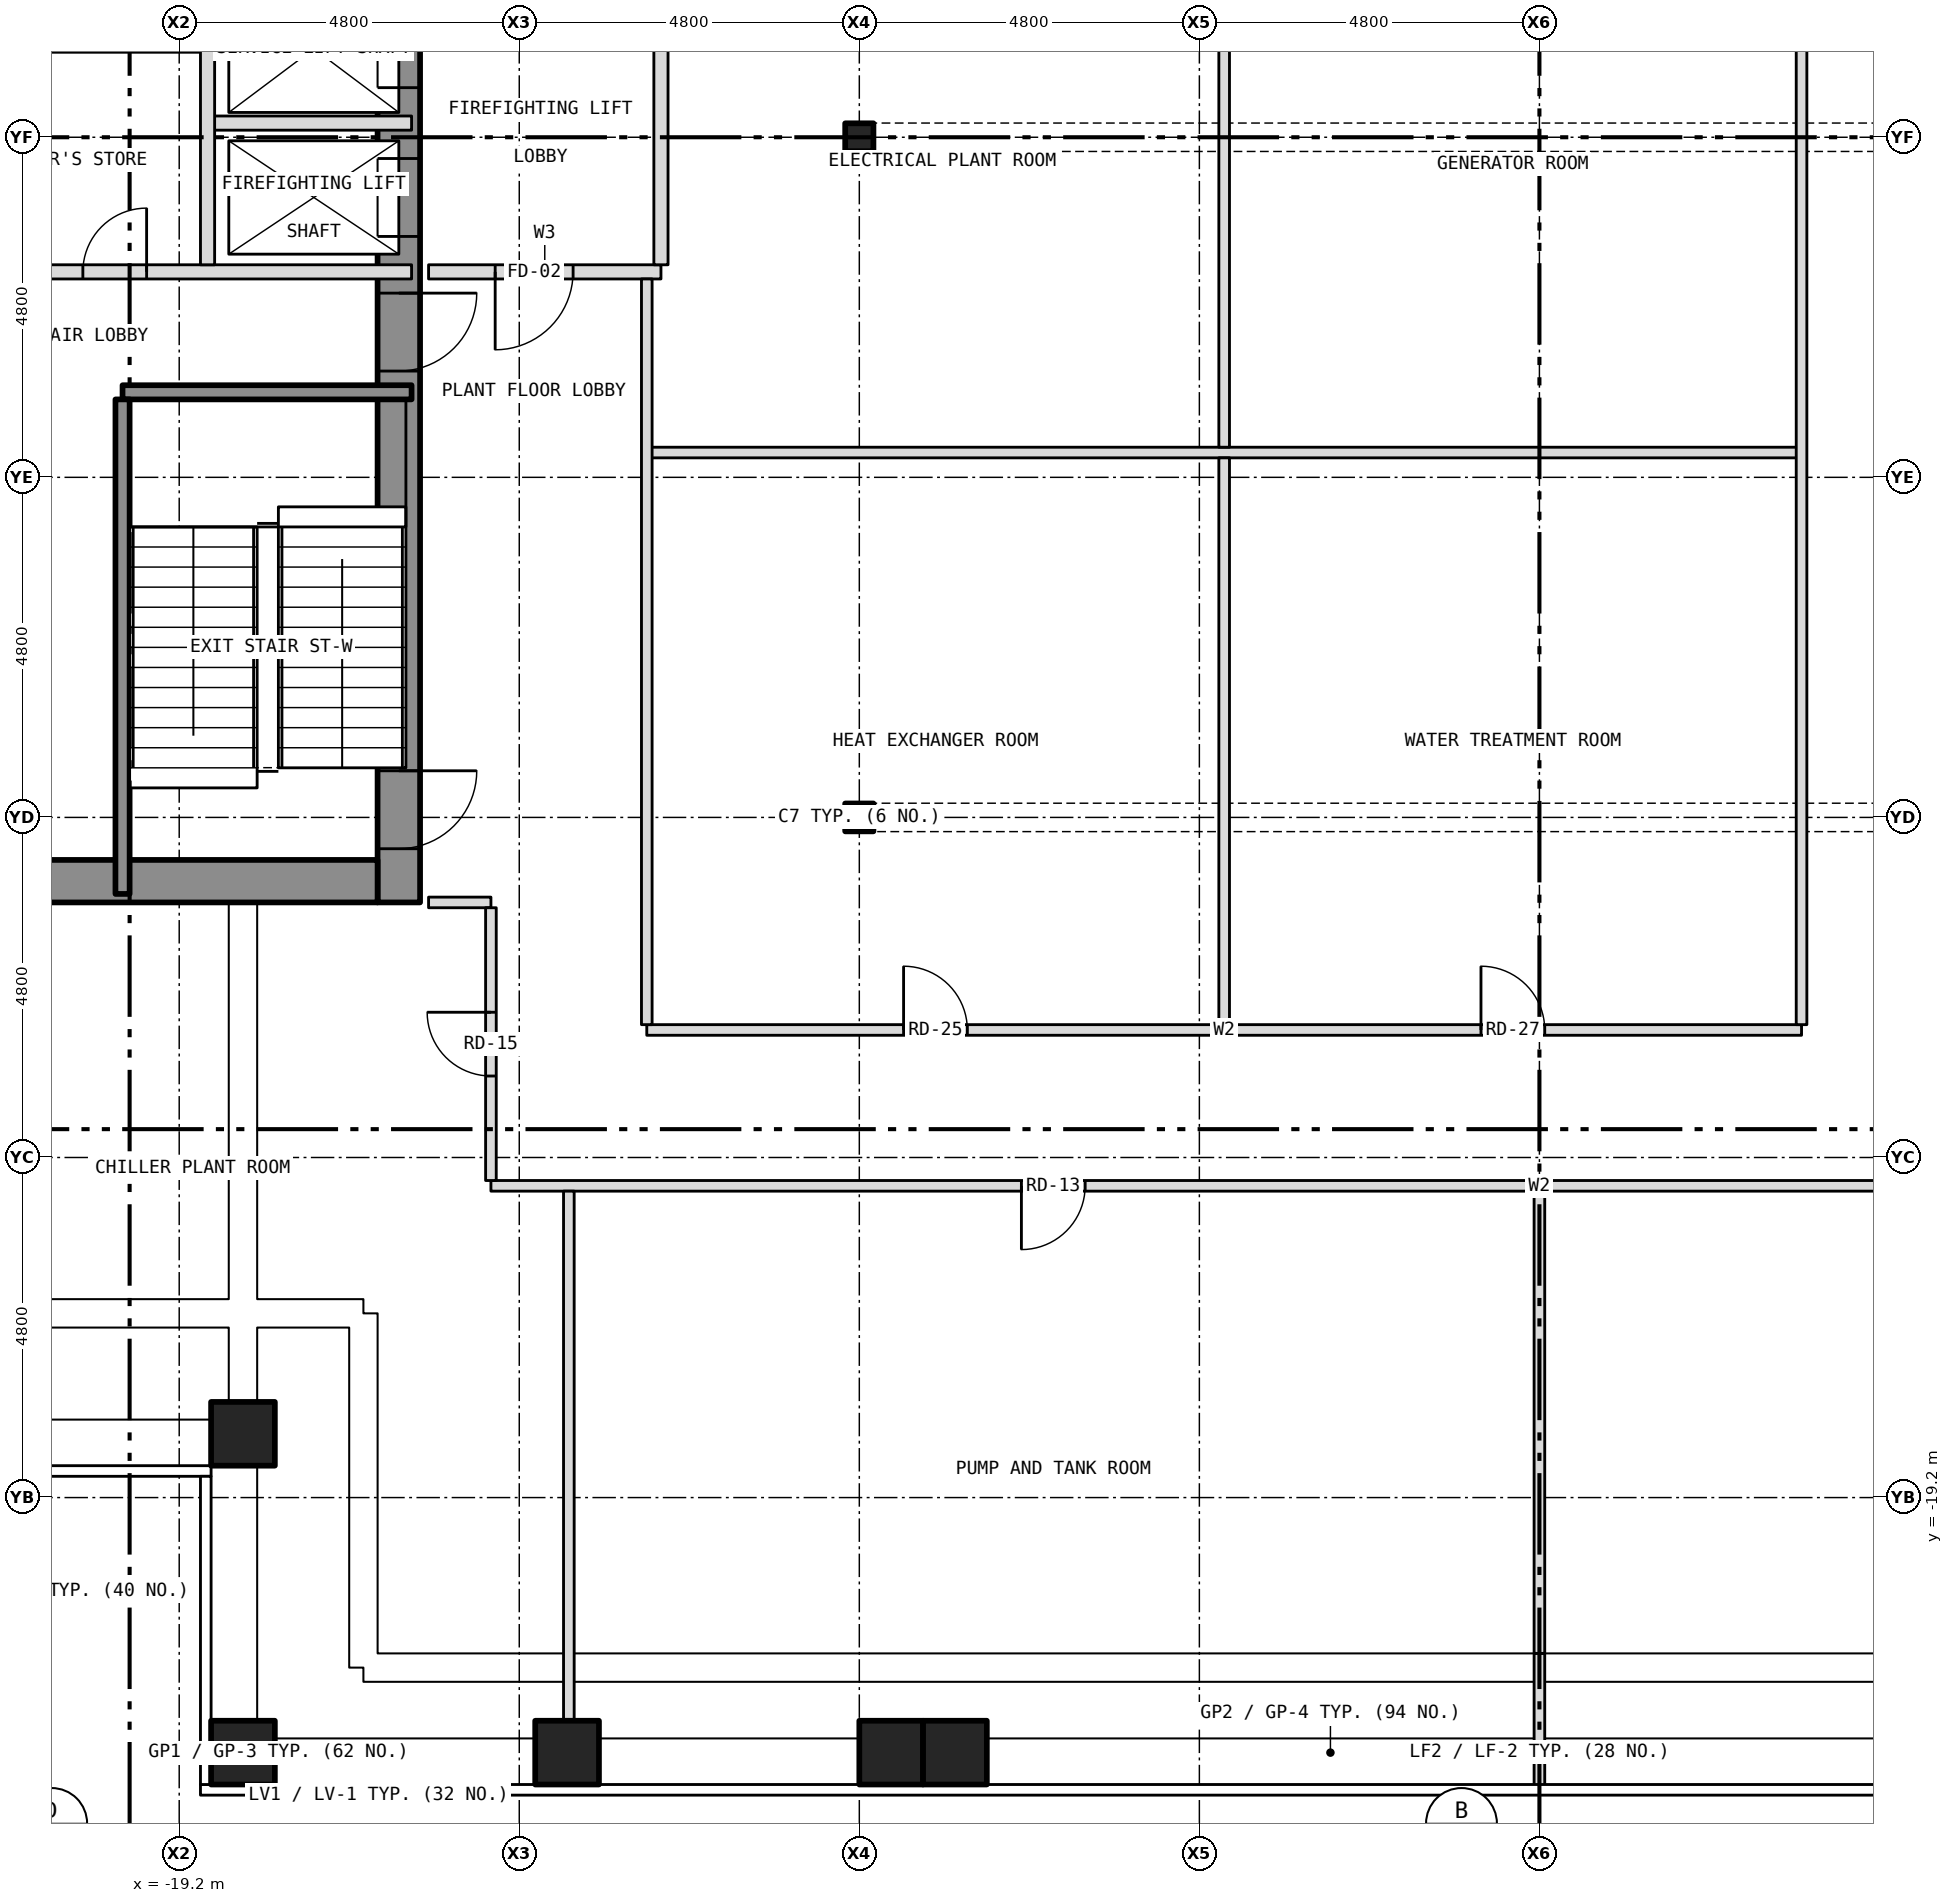
"""IFC4 building model, lengths in metres.
Left out: names, types, materials, properties, quantities, classifications, styles, units other than length and angle.
Written with IfcOpenShell. Run it as: python <this file> out.ifc"""

import sys

from ifc_helpers import new_model, si_unit, direction, frame, frame_2d, origin, origin_2d, place, context, subcontext, project, spatial, rectangle, hollow_rectangle, i_section, extrude, element, fill, save


model = new_model("IFC4")
c1 = context("Model", 3, precision=1e-05, world=origin(), true_north=direction((0.0, 1.0)))
c2 = subcontext(c1, "Body", "Model", "MODEL_VIEW")
j1 = project(units=[si_unit("LENGTHUNIT", "METRE"), si_unit("PLANEANGLEUNIT", "RADIAN")], contexts=[c1])
p1 = place(None, origin())
s1 = spatial("IfcSite", under=j1, at=p1, CompositionType="ELEMENT")
p2 = place(p1, origin())
s2 = spatial("IfcBuilding", under=s1, at=p2, CompositionType="ELEMENT")
p3 = place(p2, frame((0.0, 0.0, 138.0)))
s3 = spatial("IfcBuildingStorey", under=s2, at=p3, CompositionType="ELEMENT", Elevation=138.0)
for number, where, z_axis, x_axis in (
    (1, (-18.3, -22.8, -0.3), (0.0, 0.0, 1.0), (1.0, 0.0, 0.0)),
    (2, (-13.725, -22.8, -0.3), (0.0, 0.0, 1.0), (1.0, 0.0, 0.0)),
    (3, (-9.15, -22.8, -0.3), (0.0, 0.0, 1.0), (1.0, 0.0, 0.0)),
    (4, (-18.3, -18.3, -0.3), (0.0, 0.0, 1.0), (1.0, 0.0, 0.0)),
    (5, (-8.25, -22.8, -0.3), (0.0, 0.0, 1.0), (1.0, 0.0, 0.0)),
):
    element("IfcColumn", number, at=place(p3, frame(where, z_axis=z_axis, x_axis=x_axis)), inside=s3, PredefinedType="COLUMN", context=c2, shape_type="SweptSolid", body=[
        extrude(hollow_rectangle(XDim=0.9, YDim=0.9, WallThickness=0.05, at=origin_2d()), origin(), (0.0, 0.0, 1.0), 4.6),
    ])
for number, where, z_axis, x_axis in (
    (6, (-9.6, -9.6, -0.3), (0.0, 0.0, 1.0), (1.0, 0.0, 0.0)),
    (7, (-9.6, 0.0, -0.3), (0.0, 0.0, 1.0), (1.0, 0.0, 0.0)),
):
    element("IfcColumn", number, at=place(p3, frame(where, z_axis=z_axis, x_axis=x_axis)), inside=s3, PredefinedType="COLUMN", context=c2, shape_type="SweptSolid", body=[
        extrude(i_section(OverallWidth=0.399, OverallDepth=0.394, WebThickness=0.023, FlangeThickness=0.037, at=origin_2d()), origin(), (0.0, 0.0, 1.0), 4.6),
    ])
p4 = place(p3, frame((-16.1, -10.8, 0.0), z_axis=(0.0, 0.0, 1.0), x_axis=(0.0, 1.0, 0.0)))
e8 = element("IfcWall", 8, at=p4, inside=s3, PredefinedType="SHEAR", context=c2, shape_type="SweptSolid", body=[
    extrude(rectangle(XDim=21.6, YDim=0.6, at=frame_2d((10.8, 0.0))), origin(), (0.0, 0.0, 1.0), 3.9),
])
p5 = place(p4, frame((9.4, 0.0, 0.0)))
e9 = element("IfcOpeningElement", 9, at=p5, cuts=e8, PredefinedType="OPENING", context=c2, shape_type="SweptSolid", body=[
    extrude(rectangle(XDim=1.1, YDim=2.1, at=frame_2d((0.55, 1.05))), frame((0.0, 0.312, 0.0), z_axis=(0.0, -1.0, 0.0), x_axis=(1.0, 0.0, 0.0)), (0.0, 0.0, 1.0), 0.624),
])
p6 = place(p4, frame((11.5, 0.0, 0.0)))
e10 = element("IfcOpeningElement", 10, at=p6, cuts=e8, PredefinedType="OPENING", context=c2, shape_type="SweptSolid", body=[
    extrude(rectangle(XDim=1.1, YDim=2.1, at=frame_2d((0.55, 1.05))), frame((0.0, 0.312, 0.0), z_axis=(0.0, -1.0, 0.0), x_axis=(1.0, 0.0, 0.0)), (0.0, 0.0, 1.0), 0.624),
])
p7 = place(p4, frame((0.758, 0.0, 0.0)))
e11 = element("IfcOpeningElement", 11, at=p7, cuts=e8, PredefinedType="OPENING", context=c2, shape_type="SweptSolid", body=[
    extrude(rectangle(XDim=1.1, YDim=2.1, at=frame_2d((0.55, 1.05))), frame((0.0, 0.312, 0.0), z_axis=(0.0, -1.0, 0.0), x_axis=(1.0, 0.0, 0.0)), (0.0, 0.0, 1.0), 0.624),
])
p8 = place(p4, frame((7.5, 0.0, 0.0)))
e12 = element("IfcOpeningElement", 12, at=p8, cuts=e8, PredefinedType="OPENING", context=c2, shape_type="SweptSolid", body=[
    extrude(rectangle(XDim=1.1, YDim=2.1, at=frame_2d((0.55, 1.05))), frame((0.0, 0.312, 0.0), z_axis=(0.0, -1.0, 0.0), x_axis=(1.0, 0.0, 0.0)), (0.0, 0.0, 1.0), 0.624),
])
p9 = place(p3, frame((-22.2, -10.5, 0.0), z_axis=(0.0, 0.0, 1.0), x_axis=(1.0, 0.0, 0.0)))
e13 = element("IfcWall", 13, at=p9, inside=s3, PredefinedType="SHEAR", context=c2, shape_type="SweptSolid", body=[
    extrude(rectangle(XDim=5.8, YDim=0.6, at=frame_2d((2.9, 0.0))), origin(), (0.0, 0.0, 1.0), 3.9),
])
p10 = place(p3, frame((-14.8, -14.8, 0.0), z_axis=(0.0, 0.0, 1.0), x_axis=(1.0, 0.0, 0.0)))
e14 = element("IfcWall", 14, at=p10, inside=s3, PredefinedType="PARTITIONING", context=c2, shape_type="SweptSolid", body=[
    extrude(rectangle(XDim=29.6, YDim=0.15, at=frame_2d((14.8, 0.0))), origin(), (0.0, 0.0, 1.0), 4.3),
])
p11 = place(p10, frame((7.488, 0.0, 0.0)))
e15 = element("IfcOpeningElement", 15, at=p11, cuts=e14, PredefinedType="OPENING", context=c2, shape_type="SweptSolid", body=[
    extrude(rectangle(XDim=0.9, YDim=2.1, at=frame_2d((0.45, 1.05))), frame((0.0, 0.087, 0.0), z_axis=(0.0, -1.0, 0.0), x_axis=(1.0, 0.0, 0.0)), (0.0, 0.0, 1.0), 0.174),
])
p12 = place(p10, frame((21.213, 0.0, 0.0)))
e16 = element("IfcOpeningElement", 16, at=p12, cuts=e14, PredefinedType="OPENING", context=c2, shape_type="SweptSolid", body=[
    extrude(rectangle(XDim=0.9, YDim=2.1, at=frame_2d((0.45, 1.05))), frame((0.0, 0.087, 0.0), z_axis=(0.0, -1.0, 0.0), x_axis=(1.0, 0.0, 0.0)), (0.0, 0.0, 1.0), 0.174),
])
p13 = place(p3, frame((-12.6, -12.6, 0.0), z_axis=(0.0, 0.0, 1.0), x_axis=(1.0, 0.0, 0.0)))
e17 = element("IfcWall", 17, at=p13, inside=s3, PredefinedType="PARTITIONING", context=c2, shape_type="SweptSolid", body=[
    extrude(rectangle(XDim=16.3, YDim=0.15, at=frame_2d((8.15, 0.0))), origin(), (0.0, 0.0, 1.0), 4.3),
])
p14 = place(p13, frame((3.625, 0.0, 0.0)))
e18 = element("IfcOpeningElement", 18, at=p14, cuts=e17, PredefinedType="OPENING", context=c2, shape_type="SweptSolid", body=[
    extrude(rectangle(XDim=0.9, YDim=2.1, at=frame_2d((0.45, 1.05))), frame((0.0, 0.087, 0.0), z_axis=(0.0, -1.0, 0.0), x_axis=(1.0, 0.0, 0.0)), (0.0, 0.0, 1.0), 0.174),
])
p15 = place(p13, frame((11.775, 0.0, 0.0)))
e19 = element("IfcOpeningElement", 19, at=p15, cuts=e17, PredefinedType="OPENING", context=c2, shape_type="SweptSolid", body=[
    extrude(rectangle(XDim=0.9, YDim=2.1, at=frame_2d((0.45, 1.05))), frame((0.0, 0.087, 0.0), z_axis=(0.0, -1.0, 0.0), x_axis=(1.0, 0.0, 0.0)), (0.0, 0.0, 1.0), 0.174),
])
p16 = place(p3, frame((-15.68, -10.8, 0.0), z_axis=(0.0, 0.0, 1.0), x_axis=(1.0, 0.0, 0.0)))
e20 = element("IfcWall", 20, at=p16, inside=s3, PredefinedType="PARTITIONING", context=c2, shape_type="SweptSolid", body=[
    extrude(rectangle(XDim=0.88, YDim=0.15, at=frame_2d((0.44, 0.0))), origin(), (0.0, 0.0, 1.0), 4.3),
])
p17 = place(p3, frame((-12.6, -4.45, 0.0), z_axis=(0.0, 0.0, 1.0), x_axis=(1.0, 0.0, 0.0)))
e21 = element("IfcWall", 21, at=p17, inside=s3, PredefinedType="PARTITIONING", context=c2, shape_type="SweptSolid", body=[
    extrude(rectangle(XDim=16.3, YDim=0.15, at=frame_2d((8.15, 0.0))), origin(), (0.0, 0.0, 1.0), 4.3),
])
p18 = place(p3, frame((-20.0, -3.6, 0.0), z_axis=(0.0, 0.0, 1.0), x_axis=(1.0, 0.0, 0.0)))
e22 = element("IfcWall", 22, at=p18, inside=s3, PredefinedType="SHEAR", context=c2, shape_type="SweptSolid", body=[
    extrude(rectangle(XDim=4.08, YDim=0.2, at=frame_2d((2.04, 0.0))), origin(), (0.0, 0.0, 1.0), 3.9),
])
p19 = place(p3, frame((-22.68, -1.9, 0.0), z_axis=(0.0, 0.0, 1.0), x_axis=(1.0, 0.0, 0.0)))
e23 = element("IfcWall", 23, at=p19, inside=s3, PredefinedType="PARTITIONING", context=c2, shape_type="SweptSolid", body=[
    extrude(rectangle(XDim=6.76, YDim=0.2, at=frame_2d((3.38, 0.0))), origin(), (0.0, 0.0, 1.0), 3.9),
])
p20 = place(p19, frame((2.12, 0.0, 0.0)))
e24 = element("IfcOpeningElement", 24, at=p20, cuts=e23, PredefinedType="OPENING", context=c2, shape_type="SweptSolid", body=[
    extrude(rectangle(XDim=0.9, YDim=2.1, at=frame_2d((0.45, 1.05))), frame((0.0, 0.112, 0.0), z_axis=(0.0, -1.0, 0.0), x_axis=(1.0, 0.0, 0.0)), (0.0, 0.0, 1.0), 0.224),
])
p21 = place(p3, frame((-15.68, -1.9, 0.0), z_axis=(0.0, 0.0, 1.0), x_axis=(1.0, 0.0, 0.0)))
e25 = element("IfcWall", 25, at=p21, inside=s3, PredefinedType="PARTITIONING", context=c2, shape_type="SweptSolid", body=[
    extrude(rectangle(XDim=3.28, YDim=0.2, at=frame_2d((1.64, 0.0))), origin(), (0.0, 0.0, 1.0), 4.3),
])
p22 = place(p21, frame((0.94, 0.0, 0.0)))
e26 = element("IfcOpeningElement", 26, at=p22, cuts=e25, PredefinedType="OPENING", context=c2, shape_type="SweptSolid", body=[
    extrude(rectangle(XDim=1.1, YDim=2.1, at=frame_2d((0.55, 1.05))), frame((0.0, 0.112, 0.0), z_axis=(0.0, -1.0, 0.0), x_axis=(1.0, 0.0, 0.0)), (0.0, 0.0, 1.0), 0.224),
])
p23 = place(p3, frame((-18.8, 0.2, 0.0), z_axis=(0.0, 0.0, 1.0), x_axis=(1.0, 0.0, 0.0)))
e27 = element("IfcWall", 27, at=p23, inside=s3, PredefinedType="PARTITIONING", context=c2, shape_type="SweptSolid", body=[
    extrude(rectangle(XDim=2.88, YDim=0.2, at=frame_2d((1.44, 0.0))), origin(), (0.0, 0.0, 1.0), 3.9),
])
p24 = place(p3, frame((-20.0, -10.68, 0.0), z_axis=(0.0, 0.0, 1.0), x_axis=(0.0, 1.0, 0.0)))
e28 = element("IfcWall", 28, at=p24, inside=s3, PredefinedType="SHEAR", context=c2, shape_type="SweptSolid", body=[
    extrude(rectangle(XDim=6.98, YDim=0.2, at=frame_2d((3.49, 0.0))), origin(), (0.0, 0.0, 1.0), 3.9),
])
p25 = place(p3, frame((-18.8, -1.8, 0.0), z_axis=(0.0, 0.0, 1.0), x_axis=(0.0, 1.0, 0.0)))
e29 = element("IfcWall", 29, at=p25, inside=s3, PredefinedType="PARTITIONING", context=c2, shape_type="SweptSolid", body=[
    extrude(rectangle(XDim=12.48, YDim=0.2, at=frame_2d((6.24, 0.0))), origin(), (0.0, 0.0, 1.0), 3.9),
])
p26 = place(p3, frame((-14.8, -14.725, 0.0), z_axis=(0.0, 0.0, 1.0), x_axis=(0.0, 1.0, 0.0)))
e30 = element("IfcWall", 30, at=p26, inside=s3, PredefinedType="PARTITIONING", context=c2, shape_type="SweptSolid", body=[
    extrude(rectangle(XDim=3.85, YDim=0.15, at=frame_2d((1.925, 0.0))), origin(), (0.0, 0.0, 1.0), 4.3),
])
p27 = place(p26, frame((1.475, 0.0, 0.0)))
e31 = element("IfcOpeningElement", 31, at=p27, cuts=e30, PredefinedType="OPENING", context=c2, shape_type="SweptSolid", body=[
    extrude(rectangle(XDim=0.9, YDim=2.1, at=frame_2d((0.45, 1.05))), frame((0.0, 0.087, 0.0), z_axis=(0.0, -1.0, 0.0), x_axis=(1.0, 0.0, 0.0)), (0.0, 0.0, 1.0), 0.174),
])
p28 = place(p3, frame((-13.7, -22.68, 0.0), z_axis=(0.0, 0.0, 1.0), x_axis=(0.0, 1.0, 0.0)))
e32 = element("IfcWall", 32, at=p28, inside=s3, PredefinedType="PARTITIONING", context=c2, shape_type="SweptSolid", body=[
    extrude(rectangle(XDim=7.805, YDim=0.15, at=frame_2d((3.902, 0.0))), origin(), (0.0, 0.0, 1.0), 4.3),
])
p29 = place(p3, frame((-12.6, -12.525, 0.0), z_axis=(0.0, 0.0, 1.0), x_axis=(0.0, 1.0, 0.0)))
e33 = element("IfcWall", 33, at=p29, inside=s3, PredefinedType="PARTITIONING", context=c2, shape_type="SweptSolid", body=[
    extrude(rectangle(XDim=10.525, YDim=0.15, at=frame_2d((5.262, 0.0))), origin(), (0.0, 0.0, 1.0), 4.3),
])
p30 = place(p3, frame((-12.4, -1.8, 0.0), z_axis=(0.0, 0.0, 1.0), x_axis=(0.0, 1.0, 0.0)))
e34 = element("IfcWall", 34, at=p30, inside=s3, PredefinedType="PARTITIONING", context=c2, shape_type="SweptSolid", body=[
    extrude(rectangle(XDim=4.0, YDim=0.2, at=frame_2d((2.0, 0.0))), origin(), (0.0, 0.0, 1.0), 4.3),
])
for number, where, z_axis, x_axis in (
    (35, (-4.45, -12.525, 0.0), (0.0, 0.0, 1.0), (0.0, 1.0, 0.0)),
    (36, (-4.45, -4.375, 0.0), (0.0, 0.0, 1.0), (0.0, 1.0, 0.0)),
):
    element("IfcWall", number, at=place(p3, frame(where, z_axis=z_axis, x_axis=x_axis)), inside=s3, PredefinedType="PARTITIONING", context=c2, shape_type="SweptSolid", body=[
        extrude(rectangle(XDim=8.0, YDim=0.15, at=frame_2d((4.0, 0.0))), origin(), (0.0, 0.0, 1.0), 4.3),
    ])
p31 = place(p3, frame((0.0, -23.28, 0.0), z_axis=(0.0, 0.0, 1.0), x_axis=(0.0, 1.0, 0.0)))
e37 = element("IfcWall", 37, at=p31, inside=s3, PredefinedType="PARTITIONING", context=c2, shape_type="SweptSolid", body=[
    extrude(rectangle(XDim=1.881, YDim=0.15, at=frame_2d((0.94, 0.0))), origin(), (0.0, 0.0, 1.0), 4.3),
])
p32 = place(p3, frame((0.0, -21.399, 0.0), z_axis=(0.0, 0.0, 1.0), x_axis=(0.0, 1.0, 0.0)))
e38 = element("IfcWall", 38, at=p32, inside=s3, PredefinedType="PARTITIONING", context=c2, shape_type="SweptSolid", body=[
    extrude(rectangle(XDim=6.524, YDim=0.15, at=frame_2d((3.262, 0.0))), origin(), (0.0, 0.0, 1.0), 3.678),
])
p33 = place(p3, frame((3.7, -12.525, 0.0), z_axis=(0.0, 0.0, 1.0), x_axis=(0.0, 1.0, 0.0)))
e39 = element("IfcWall", 39, at=p33, inside=s3, PredefinedType="PARTITIONING", context=c2, shape_type="SweptSolid", body=[
    extrude(rectangle(XDim=16.15, YDim=0.15, at=frame_2d((8.075, 0.0))), origin(), (0.0, 0.0, 1.0), 4.3),
])
p34 = place(p5, origin())
e40 = element("IfcDoor", 40, at=p34, inside=s3, OperationType="SLIDING_TO_LEFT", PredefinedType="DOOR", context=c2, shape_type="SweptSolid", body=[
    extrude(rectangle(XDim=1.1, YDim=2.1, at=frame_2d((0.55, 1.05))), frame((0.0, 0.025, 0.0), z_axis=(0.0, -1.0, 0.0), x_axis=(1.0, 0.0, 0.0)), (0.0, 0.0, 1.0), 0.05),
])
fill(e9, e40)
p35 = place(p6, origin())
e41 = element("IfcDoor", 41, at=p35, inside=s3, OperationType="SLIDING_TO_LEFT", PredefinedType="DOOR", context=c2, shape_type="SweptSolid", body=[
    extrude(rectangle(XDim=1.1, YDim=2.1, at=frame_2d((0.55, 1.05))), frame((0.0, 0.025, 0.0), z_axis=(0.0, -1.0, 0.0), x_axis=(1.0, 0.0, 0.0)), (0.0, 0.0, 1.0), 0.05),
])
fill(e10, e41)
p36 = place(p7, origin())
e42 = element("IfcDoor", 42, at=p36, inside=s3, OperationType="SINGLE_SWING_RIGHT", PredefinedType="DOOR", context=c2, shape_type="SweptSolid", body=[
    extrude(rectangle(XDim=1.1, YDim=2.1, at=frame_2d((0.55, 1.05))), frame((0.0, 0.025, 0.0), z_axis=(0.0, -1.0, 0.0), x_axis=(1.0, 0.0, 0.0)), (0.0, 0.0, 1.0), 0.05),
])
fill(e11, e42)
p37 = place(p8, origin())
e43 = element("IfcDoor", 43, at=p37, inside=s3, OperationType="SINGLE_SWING_RIGHT", PredefinedType="DOOR", context=c2, shape_type="SweptSolid", body=[
    extrude(rectangle(XDim=1.1, YDim=2.1, at=frame_2d((0.55, 1.05))), frame((0.0, 0.025, 0.0), z_axis=(0.0, -1.0, 0.0), x_axis=(1.0, 0.0, 0.0)), (0.0, 0.0, 1.0), 0.05),
])
fill(e12, e43)
p38 = place(p20, origin())
e44 = element("IfcDoor", 44, at=p38, inside=s3, OperationType="SINGLE_SWING_RIGHT", PredefinedType="DOOR", context=c2, shape_type="SweptSolid", body=[
    extrude(rectangle(XDim=0.9, YDim=2.1, at=frame_2d((0.45, 1.05))), frame((0.0, 0.025, 0.0), z_axis=(0.0, -1.0, 0.0), x_axis=(1.0, 0.0, 0.0)), (0.0, 0.0, 1.0), 0.05),
])
fill(e24, e44)
p39 = place(p22, origin())
e45 = element("IfcDoor", 45, at=p39, inside=s3, OperationType="SINGLE_SWING_LEFT", PredefinedType="DOOR", context=c2, shape_type="SweptSolid", body=[
    extrude(rectangle(XDim=1.1, YDim=2.1, at=frame_2d((0.55, 1.05))), frame((0.0, 0.025, 0.0), z_axis=(0.0, -1.0, 0.0), x_axis=(1.0, 0.0, 0.0)), (0.0, 0.0, 1.0), 0.05),
])
fill(e26, e45)
p40 = place(p11, origin())
e46 = element("IfcDoor", 46, at=p40, inside=s3, OperationType="SINGLE_SWING_LEFT", PredefinedType="DOOR", context=c2, shape_type="SweptSolid", body=[
    extrude(rectangle(XDim=0.9, YDim=2.1, at=frame_2d((0.45, 1.05))), frame((0.0, 0.025, 0.0), z_axis=(0.0, -1.0, 0.0), x_axis=(1.0, 0.0, 0.0)), (0.0, 0.0, 1.0), 0.05),
])
fill(e15, e46)
p41 = place(p27, origin())
e47 = element("IfcDoor", 47, at=p41, inside=s3, OperationType="SINGLE_SWING_RIGHT", PredefinedType="DOOR", context=c2, shape_type="SweptSolid", body=[
    extrude(rectangle(XDim=0.9, YDim=2.1, at=frame_2d((0.45, 1.05))), frame((0.0, 0.025, 0.0), z_axis=(0.0, -1.0, 0.0), x_axis=(1.0, 0.0, 0.0)), (0.0, 0.0, 1.0), 0.05),
])
fill(e31, e47)
p42 = place(p14, origin())
e48 = element("IfcDoor", 48, at=p42, inside=s3, OperationType="SINGLE_SWING_LEFT", PredefinedType="DOOR", context=c2, shape_type="SweptSolid", body=[
    extrude(rectangle(XDim=0.9, YDim=2.1, at=frame_2d((0.45, 1.05))), frame((0.0, 0.025, 0.0), z_axis=(0.0, -1.0, 0.0), x_axis=(1.0, 0.0, 0.0)), (0.0, 0.0, 1.0), 0.05),
])
fill(e18, e48)
p43 = place(p15, origin())
e49 = element("IfcDoor", 49, at=p43, inside=s3, OperationType="SINGLE_SWING_LEFT", PredefinedType="DOOR", context=c2, shape_type="SweptSolid", body=[
    extrude(rectangle(XDim=0.9, YDim=2.1, at=frame_2d((0.45, 1.05))), frame((0.0, 0.025, 0.0), z_axis=(0.0, -1.0, 0.0), x_axis=(1.0, 0.0, 0.0)), (0.0, 0.0, 1.0), 0.05),
])
fill(e19, e49)
save(model, sys.argv[1])
